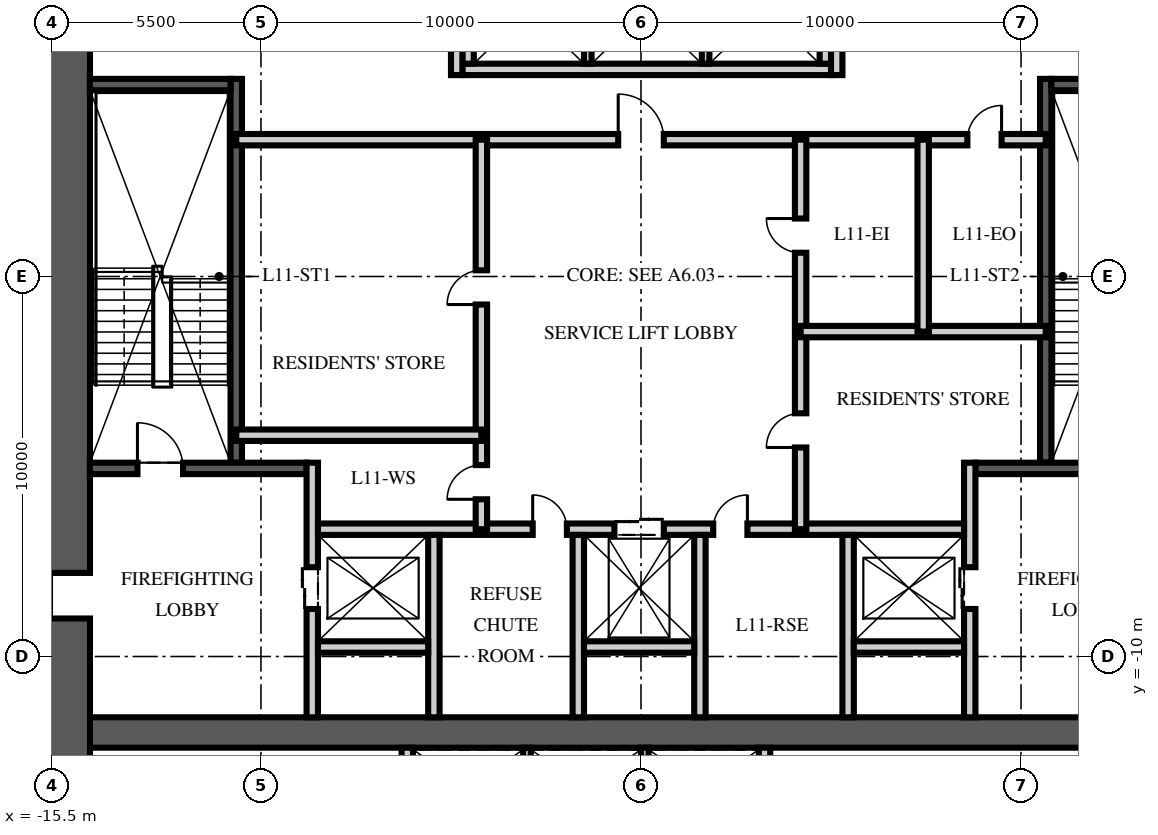
"""IFC4 building model, lengths in metres.
Left out: names, types, materials, properties, quantities, classifications, styles, units other than length and angle.
Written with IfcOpenShell. Run it as: python <this file> out.ifc"""

import sys

from ifc_helpers import new_model, si_unit, direction, frame, frame_2d, origin, place, context, subcontext, project, spatial, rectangle, extrude, element, fill, save


model = new_model("IFC4")
c1 = context("Model", 3, precision=1e-05, world=origin(), true_north=direction((0.0, 1.0)))
c2 = subcontext(c1, "Body", "Model", "MODEL_VIEW")
j1 = project(units=[si_unit("LENGTHUNIT", "METRE"), si_unit("PLANEANGLEUNIT", "RADIAN")], contexts=[c1])
p1 = place(None, origin())
s1 = spatial("IfcSite", under=j1, at=p1, CompositionType="ELEMENT")
p2 = place(p1, origin())
s2 = spatial("IfcBuilding", under=s1, at=p2, CompositionType="ELEMENT")
p3 = place(p2, frame((0.0, 0.0, 47.25)))
s3 = spatial("IfcBuildingStorey", under=s2, at=p3, CompositionType="ELEMENT", Elevation=47.25)
p4 = place(p3, frame((-15.5, -12.0, -0.25), z_axis=(0.0, 0.0, 1.0), x_axis=(1.0, 0.0, 0.0)))
e1 = element("IfcWall", 1, at=p4, inside=s3, PredefinedType="SHEAR", context=c2, shape_type="SweptSolid", body=[
    extrude(rectangle(XDim=31.0, YDim=0.8, at=frame_2d((15.5, 0.0))), origin(), (0.0, 0.0, 1.0), 3.75),
])
p5 = place(p3, frame((-15.5, -15.5, -0.25), z_axis=(0.0, 0.0, 1.0), x_axis=(0.0, 1.0, 0.0)))
e2 = element("IfcWall", 2, at=p5, inside=s3, PredefinedType="SHEAR", context=c2, shape_type="SweptSolid", body=[
    extrude(rectangle(XDim=31.0, YDim=2.0, at=frame_2d((15.5, 0.0))), origin(), (0.0, 0.0, 1.0), 3.75),
])
p6 = place(p5, frame((6.5, 0.0, 0.25)))
e3 = element("IfcOpeningElement", 3, at=p6, cuts=e2, PredefinedType="OPENING", context=c2, shape_type="SweptSolid", body=[
    extrude(rectangle(XDim=1.2, YDim=2.1, at=frame_2d((0.6, 1.05))), frame((0.0, 1.01, 0.0), z_axis=(0.0, -1.0, 0.0), x_axis=(1.0, 0.0, 0.0)), (0.0, 0.0, 1.0), 2.02),
])
p7 = place(p5, frame((23.0, 0.0, 0.25)))
e4 = element("IfcOpeningElement", 4, at=p7, cuts=e2, PredefinedType="OPENING", context=c2, shape_type="SweptSolid", body=[
    extrude(rectangle(XDim=1.8, YDim=2.1, at=frame_2d((0.9, 1.05))), frame((0.0, 1.01, 0.0), z_axis=(0.0, -1.0, 0.0), x_axis=(1.0, 0.0, 0.0)), (0.0, 0.0, 1.0), 2.02),
])
p8 = place(p3, frame((-10.65, -4.9, 0.0), z_axis=(0.0, 0.0, 1.0), x_axis=(0.0, 1.0, 0.0)))
e5 = element("IfcWall", 5, at=p8, inside=s3, PredefinedType="SOLIDWALL", context=c2, shape_type="SweptSolid", body=[
    extrude(rectangle(XDim=10.1, YDim=0.3, at=frame_2d((5.05, 0.0))), origin(), (0.0, 0.0, 1.0), 3.5),
])
p9 = place(p3, frame((-14.5, -5.05, 0.0), z_axis=(0.0, 0.0, 1.0), x_axis=(1.0, 0.0, 0.0)))
e6 = element("IfcWall", 6, at=p9, inside=s3, PredefinedType="SOLIDWALL", context=c2, shape_type="SweptSolid", body=[
    extrude(rectangle(XDim=5.7, YDim=0.3, at=frame_2d((2.85, 0.0))), origin(), (0.0, 0.0, 1.0), 3.5),
])
p10 = place(p9, frame((1.25, 0.0, 0.0)))
e7 = element("IfcOpeningElement", 7, at=p10, cuts=e6, PredefinedType="OPENING", context=c2, shape_type="SweptSolid", body=[
    extrude(rectangle(XDim=1.2, YDim=2.1, at=frame_2d((0.6, 1.05))), frame((0.0, 0.16, 0.0), z_axis=(0.0, -1.0, 0.0), x_axis=(1.0, 0.0, 0.0)), (0.0, 0.0, 1.0), 0.32),
])
p11 = place(p3, frame((-14.5, 5.05, 0.0), z_axis=(0.0, 0.0, 1.0), x_axis=(1.0, 0.0, 0.0)))
e8 = element("IfcWall", 8, at=p11, inside=s3, PredefinedType="SOLIDWALL", context=c2, shape_type="SweptSolid", body=[
    extrude(rectangle(XDim=3.7, YDim=0.3, at=frame_2d((1.85, 0.0))), origin(), (0.0, 0.0, 1.0), 3.5),
])
p12 = place(p3, frame((-8.65, -11.6, 0.0), z_axis=(0.0, 0.0, 1.0), x_axis=(0.0, 1.0, 0.0)))
e9 = element("IfcWall", 9, at=p12, inside=s3, PredefinedType="PARTITIONING", context=c2, shape_type="SweptSolid", body=[
    extrude(rectangle(XDim=6.7, YDim=0.3, at=frame_2d((3.35, 0.0))), origin(), (0.0, 0.0, 1.0), 3.5),
])
p13 = place(p12, frame((2.85, 0.0, 0.0)))
e10 = element("IfcOpeningElement", 10, at=p13, cuts=e9, PredefinedType="OPENING", context=c2, shape_type="SweptSolid", body=[
    extrude(rectangle(XDim=1.1, YDim=2.1, at=frame_2d((0.55, 1.05))), frame((0.0, 0.16, 0.0), z_axis=(0.0, -1.0, 0.0), x_axis=(1.0, 0.0, 0.0)), (0.0, 0.0, 1.0), 0.32),
])
p14 = place(p3, frame((10.65, -4.9, 0.0), z_axis=(0.0, 0.0, 1.0), x_axis=(0.0, 1.0, 0.0)))
e11 = element("IfcWall", 11, at=p14, inside=s3, PredefinedType="SOLIDWALL", context=c2, shape_type="SweptSolid", body=[
    extrude(rectangle(XDim=10.1, YDim=0.3, at=frame_2d((5.05, 0.0))), origin(), (0.0, 0.0, 1.0), 3.5),
])
p15 = place(p3, frame((14.5, -5.05, 0.0), z_axis=(0.0, 0.0, 1.0), x_axis=(-1.0, 0.0, 0.0)))
e12 = element("IfcWall", 12, at=p15, inside=s3, PredefinedType="SOLIDWALL", context=c2, shape_type="SweptSolid", body=[
    extrude(rectangle(XDim=5.7, YDim=0.3, at=frame_2d((2.85, 0.0))), origin(), (0.0, 0.0, 1.0), 3.5),
])
p16 = place(p15, frame((1.25, 0.0, 0.0)))
e13 = element("IfcOpeningElement", 13, at=p16, cuts=e12, PredefinedType="OPENING", context=c2, shape_type="SweptSolid", body=[
    extrude(rectangle(XDim=1.2, YDim=2.1, at=frame_2d((0.6, 1.05))), frame((0.0, 0.16, 0.0), z_axis=(0.0, -1.0, 0.0), x_axis=(1.0, 0.0, 0.0)), (0.0, 0.0, 1.0), 0.32),
])
p17 = place(p3, frame((14.5, 5.05, 0.0), z_axis=(0.0, 0.0, 1.0), x_axis=(-1.0, 0.0, 0.0)))
e14 = element("IfcWall", 14, at=p17, inside=s3, PredefinedType="SOLIDWALL", context=c2, shape_type="SweptSolid", body=[
    extrude(rectangle(XDim=3.7, YDim=0.3, at=frame_2d((1.85, 0.0))), origin(), (0.0, 0.0, 1.0), 3.5),
])
p18 = place(p3, frame((8.65, -11.6, 0.0), z_axis=(0.0, 0.0, 1.0), x_axis=(0.0, 1.0, 0.0)))
e15 = element("IfcWall", 15, at=p18, inside=s3, PredefinedType="PARTITIONING", context=c2, shape_type="SweptSolid", body=[
    extrude(rectangle(XDim=6.7, YDim=0.3, at=frame_2d((3.35, 0.0))), origin(), (0.0, 0.0, 1.0), 3.5),
])
p19 = place(p18, frame((2.85, 0.0, 0.0)))
e16 = element("IfcOpeningElement", 16, at=p19, cuts=e15, PredefinedType="OPENING", context=c2, shape_type="SweptSolid", body=[
    extrude(rectangle(XDim=1.1, YDim=2.1, at=frame_2d((0.55, 1.05))), frame((0.0, 0.16, 0.0), z_axis=(0.0, -1.0, 0.0), x_axis=(1.0, 0.0, 0.0)), (0.0, 0.0, 1.0), 0.32),
])
p20 = place(p3, frame((-8.5, -6.65, 0.0), z_axis=(0.0, 0.0, 1.0), x_axis=(1.0, 0.0, 0.0)))
e17 = element("IfcWall", 17, at=p20, inside=s3, PredefinedType="PARTITIONING", context=c2, shape_type="SweptSolid", body=[
    extrude(rectangle(XDim=17.0, YDim=0.3, at=frame_2d((8.5, 0.0))), origin(), (0.0, 0.0, 1.0), 3.5),
])
p21 = place(p20, frame((7.8, 0.0, 0.0)))
e18 = element("IfcOpeningElement", 18, at=p21, cuts=e17, PredefinedType="OPENING", context=c2, shape_type="SweptSolid", body=[
    extrude(rectangle(XDim=1.3, YDim=2.4, at=frame_2d((0.65, 1.2))), frame((0.0, 0.16, 0.0), z_axis=(0.0, -1.0, 0.0), x_axis=(1.0, 0.0, 0.0)), (0.0, 0.0, 1.0), 0.32),
])
p22 = place(p20, frame((5.65, 0.0, 0.0)))
e19 = element("IfcOpeningElement", 19, at=p22, cuts=e17, PredefinedType="OPENING", context=c2, shape_type="SweptSolid", body=[
    extrude(rectangle(XDim=0.9, YDim=2.1, at=frame_2d((0.45, 1.05))), frame((0.0, 0.16, 0.0), z_axis=(0.0, -1.0, 0.0), x_axis=(1.0, 0.0, 0.0)), (0.0, 0.0, 1.0), 0.32),
])
p23 = place(p20, frame((10.4, 0.0, 0.0)))
e20 = element("IfcOpeningElement", 20, at=p23, cuts=e17, PredefinedType="OPENING", context=c2, shape_type="SweptSolid", body=[
    extrude(rectangle(XDim=0.9, YDim=2.1, at=frame_2d((0.45, 1.05))), frame((0.0, 0.16, 0.0), z_axis=(0.0, -1.0, 0.0), x_axis=(1.0, 0.0, 0.0)), (0.0, 0.0, 1.0), 0.32),
])
for number, where, z_axis, x_axis in (
    (21, (-5.45, -11.6, 0.0), (0.0, 0.0, 1.0), (0.0, 1.0, 0.0)),
    (22, (-1.65, -11.6, 0.0), (0.0, 0.0, 1.0), (0.0, 1.0, 0.0)),
    (23, (1.55, -11.6, 0.0), (0.0, 0.0, 1.0), (0.0, 1.0, 0.0)),
    (24, (5.45, -11.6, 0.0), (0.0, 0.0, 1.0), (0.0, 1.0, 0.0)),
):
    element("IfcWall", number, at=place(p3, frame(where, z_axis=z_axis, x_axis=x_axis)), inside=s3, PredefinedType="PARTITIONING", context=c2, shape_type="SweptSolid", body=[
        extrude(rectangle(XDim=4.8, YDim=0.3, at=frame_2d((2.4, 0.0))), origin(), (0.0, 0.0, 1.0), 3.5),
    ])
for number, where, z_axis, x_axis in (
    (25, (-8.5, -9.75, 0.0), (0.0, 0.0, 1.0), (1.0, 0.0, 0.0)),
    (26, (-1.5, -9.75, 0.0), (0.0, 0.0, 1.0), (1.0, 0.0, 0.0)),
    (27, (5.6, -9.75, 0.0), (0.0, 0.0, 1.0), (1.0, 0.0, 0.0)),
):
    element("IfcWall", number, at=place(p3, frame(where, z_axis=z_axis, x_axis=x_axis)), inside=s3, PredefinedType="PARTITIONING", context=c2, shape_type="SweptSolid", body=[
        extrude(rectangle(XDim=2.9, YDim=0.3, at=frame_2d((1.45, 0.0))), origin(), (0.0, 0.0, 1.0), 3.5),
    ])
p24 = place(p3, frame((-4.7, 5.45, 0.0), z_axis=(0.0, 0.0, 1.0), x_axis=(1.0, 0.0, 0.0)))
e28 = element("IfcWall", 28, at=p24, inside=s3, PredefinedType="PARTITIONING", context=c2, shape_type="SweptSolid", body=[
    extrude(rectangle(XDim=9.7, YDim=0.3, at=frame_2d((4.85, 0.0))), origin(), (0.0, 0.0, 1.0), 3.5),
])
for number, where, z_axis, x_axis in (
    (29, (-4.55, 5.6, 0.0), (0.0, 0.0, 1.0), (0.0, 1.0, 0.0)),
    (30, (4.85, 5.6, 0.0), (0.0, 0.0, 1.0), (0.0, 1.0, 0.0)),
):
    element("IfcWall", number, at=place(p3, frame(where, z_axis=z_axis, x_axis=x_axis)), inside=s3, PredefinedType="PARTITIONING", context=c2, shape_type="SweptSolid", body=[
        extrude(rectangle(XDim=2.8, YDim=0.3, at=frame_2d((1.4, 0.0))), origin(), (0.0, 0.0, 1.0), 3.5),
    ])
for number, where, z_axis, x_axis in (
    (31, (-1.4, 5.6, 0.0), (0.0, 0.0, 1.0), (0.0, 1.0, 0.0)),
    (32, (1.7, 5.6, 0.0), (0.0, 0.0, 1.0), (0.0, 1.0, 0.0)),
):
    element("IfcWall", number, at=place(p3, frame(where, z_axis=z_axis, x_axis=x_axis)), inside=s3, PredefinedType="PARTITIONING", context=c2, shape_type="SweptSolid", body=[
        extrude(rectangle(XDim=2.8, YDim=0.2, at=frame_2d((1.4, 0.0))), origin(), (0.0, 0.0, 1.0), 3.5),
    ])
for number, where, z_axis, x_axis in (
    (33, (-6.15, -14.5, 0.0), (0.0, 0.0, 1.0), (0.0, 1.0, 0.0)),
    (34, (3.25, -14.5, 0.0), (0.0, 0.0, 1.0), (0.0, 1.0, 0.0)),
):
    element("IfcWall", number, at=place(p3, frame(where, z_axis=z_axis, x_axis=x_axis)), inside=s3, PredefinedType="PARTITIONING", context=c2, shape_type="SweptSolid", body=[
        extrude(rectangle(XDim=2.1, YDim=0.3, at=frame_2d((1.05, 0.0))), origin(), (0.0, 0.0, 1.0), 3.5),
    ])
for number, where, z_axis, x_axis in (
    (35, (-3.0, -14.5, 0.0), (0.0, 0.0, 1.0), (0.0, 1.0, 0.0)),
    (36, (0.1, -14.5, 0.0), (0.0, 0.0, 1.0), (0.0, 1.0, 0.0)),
):
    element("IfcWall", number, at=place(p3, frame(where, z_axis=z_axis, x_axis=x_axis)), inside=s3, PredefinedType="PARTITIONING", context=c2, shape_type="SweptSolid", body=[
        extrude(rectangle(XDim=2.1, YDim=0.2, at=frame_2d((1.05, 0.0))), origin(), (0.0, 0.0, 1.0), 3.5),
    ])
p25 = place(p3, frame((-10.65, 3.6, 0.0), z_axis=(0.0, 0.0, 1.0), x_axis=(1.0, 0.0, 0.0)))
e37 = element("IfcWall", 37, at=p25, inside=s3, PredefinedType="PARTITIONING", context=c2, shape_type="SweptSolid", body=[
    extrude(rectangle(XDim=21.3, YDim=0.3, at=frame_2d((10.65, 0.0))), origin(), (0.0, 0.0, 1.0), 3.5),
])
p26 = place(p25, frame((10.05, 0.0, 0.0)))
e38 = element("IfcOpeningElement", 38, at=p26, cuts=e37, PredefinedType="OPENING", context=c2, shape_type="SweptSolid", body=[
    extrude(rectangle(XDim=1.2, YDim=2.1, at=frame_2d((0.6, 1.05))), frame((0.0, 0.16, 0.0), z_axis=(0.0, -1.0, 0.0), x_axis=(1.0, 0.0, 0.0)), (0.0, 0.0, 1.0), 0.32),
])
p27 = place(p25, frame((19.238, 0.0, 0.0)))
e39 = element("IfcOpeningElement", 39, at=p27, cuts=e37, PredefinedType="OPENING", context=c2, shape_type="SweptSolid", body=[
    extrude(rectangle(XDim=0.9, YDim=2.1, at=frame_2d((0.45, 1.05))), frame((0.0, 0.16, 0.0), z_axis=(0.0, -1.0, 0.0), x_axis=(1.0, 0.0, 0.0)), (0.0, 0.0, 1.0), 0.32),
])
p28 = place(p3, frame((-4.2, -6.65, 0.0), z_axis=(0.0, 0.0, 1.0), x_axis=(0.0, 1.0, 0.0)))
e40 = element("IfcWall", 40, at=p28, inside=s3, PredefinedType="PARTITIONING", context=c2, shape_type="SweptSolid", body=[
    extrude(rectangle(XDim=10.25, YDim=0.3, at=frame_2d((5.125, 0.0))), origin(), (0.0, 0.0, 1.0), 3.5),
])
p29 = place(p28, frame((0.787, 0.0, 0.0)))
e41 = element("IfcOpeningElement", 41, at=p29, cuts=e40, PredefinedType="OPENING", context=c2, shape_type="SweptSolid", body=[
    extrude(rectangle(XDim=0.9, YDim=2.1, at=frame_2d((0.45, 1.05))), frame((0.0, 0.16, 0.0), z_axis=(0.0, -1.0, 0.0), x_axis=(1.0, 0.0, 0.0)), (0.0, 0.0, 1.0), 0.32),
])
p30 = place(p28, frame((5.912, 0.0, 0.0)))
e42 = element("IfcOpeningElement", 42, at=p30, cuts=e40, PredefinedType="OPENING", context=c2, shape_type="SweptSolid", body=[
    extrude(rectangle(XDim=0.9, YDim=2.1, at=frame_2d((0.45, 1.05))), frame((0.0, 0.16, 0.0), z_axis=(0.0, -1.0, 0.0), x_axis=(1.0, 0.0, 0.0)), (0.0, 0.0, 1.0), 0.32),
])
p31 = place(p3, frame((4.2, -6.65, 0.0), z_axis=(0.0, 0.0, 1.0), x_axis=(0.0, 1.0, 0.0)))
e43 = element("IfcWall", 43, at=p31, inside=s3, PredefinedType="PARTITIONING", context=c2, shape_type="SweptSolid", body=[
    extrude(rectangle(XDim=10.25, YDim=0.3, at=frame_2d((5.125, 0.0))), origin(), (0.0, 0.0, 1.0), 3.5),
])
p32 = place(p31, frame((2.15, 0.0, 0.0)))
e44 = element("IfcOpeningElement", 44, at=p32, cuts=e43, PredefinedType="OPENING", context=c2, shape_type="SweptSolid", body=[
    extrude(rectangle(XDim=0.9, YDim=2.1, at=frame_2d((0.45, 1.05))), frame((0.0, 0.16, 0.0), z_axis=(0.0, -1.0, 0.0), x_axis=(1.0, 0.0, 0.0)), (0.0, 0.0, 1.0), 0.32),
])
p33 = place(p31, frame((7.275, 0.0, 0.0)))
e45 = element("IfcOpeningElement", 45, at=p33, cuts=e43, PredefinedType="OPENING", context=c2, shape_type="SweptSolid", body=[
    extrude(rectangle(XDim=0.9, YDim=2.1, at=frame_2d((0.45, 1.05))), frame((0.0, 0.16, 0.0), z_axis=(0.0, -1.0, 0.0), x_axis=(1.0, 0.0, 0.0)), (0.0, 0.0, 1.0), 0.32),
])
for number, where, z_axis, x_axis in (
    (46, (-10.65, -4.177, 0.0), (0.0, 0.0, 1.0), (1.0, 0.0, 0.0)),
    (47, (10.65, -1.45, 0.0), (0.0, 0.0, 1.0), (-1.0, 0.0, 0.0)),
):
    element("IfcWall", number, at=place(p3, frame(where, z_axis=z_axis, x_axis=x_axis)), inside=s3, PredefinedType="PARTITIONING", context=c2, shape_type="SweptSolid", body=[
        extrude(rectangle(XDim=6.45, YDim=0.3, at=frame_2d((3.225, 0.0))), origin(), (0.0, 0.0, 1.0), 3.5),
    ])
p34 = place(p3, frame((7.425, -1.45, 0.0), z_axis=(0.0, 0.0, 1.0), x_axis=(0.0, 1.0, 0.0)))
e48 = element("IfcWall", 48, at=p34, inside=s3, PredefinedType="PARTITIONING", context=c2, shape_type="SweptSolid", body=[
    extrude(rectangle(XDim=5.05, YDim=0.3, at=frame_2d((2.525, 0.0))), origin(), (0.0, 0.0, 1.0), 3.5),
])
p35 = place(p3, frame((-4.85, 5.3, 0.0), z_axis=(0.0, 0.0, 1.0), x_axis=(0.0, 1.0, 0.0)))
e49 = element("IfcWall", 49, at=p35, inside=s3, PredefinedType="PARTITIONING", context=c2, shape_type="SweptSolid", body=[
    extrude(rectangle(XDim=6.3, YDim=0.3, at=frame_2d((3.15, 0.0))), origin(), (0.0, 0.0, 1.0), 3.5),
])
p36 = place(p35, frame((4.35, 0.0, 0.0)))
e50 = element("IfcOpeningElement", 50, at=p36, cuts=e49, PredefinedType="OPENING", context=c2, shape_type="SweptSolid", body=[
    extrude(rectangle(XDim=0.9, YDim=2.1, at=frame_2d((0.45, 1.05))), frame((0.0, 0.16, 0.0), z_axis=(0.0, -1.0, 0.0), x_axis=(1.0, 0.0, 0.0)), (0.0, 0.0, 1.0), 0.32),
])
p37 = place(p3, frame((5.15, 5.3, 0.0), z_axis=(0.0, 0.0, 1.0), x_axis=(0.0, 1.0, 0.0)))
e51 = element("IfcWall", 51, at=p37, inside=s3, PredefinedType="PARTITIONING", context=c2, shape_type="SweptSolid", body=[
    extrude(rectangle(XDim=6.3, YDim=0.3, at=frame_2d((3.15, 0.0))), origin(), (0.0, 0.0, 1.0), 3.5),
])
p38 = place(p37, frame((4.35, 0.0, 0.0)))
e52 = element("IfcOpeningElement", 52, at=p38, cuts=e51, PredefinedType="OPENING", context=c2, shape_type="SweptSolid", body=[
    extrude(rectangle(XDim=0.9, YDim=2.1, at=frame_2d((0.45, 1.05))), frame((0.0, 0.16, 0.0), z_axis=(0.0, -1.0, 0.0), x_axis=(1.0, 0.0, 0.0)), (0.0, 0.0, 1.0), 0.32),
])
p39 = place(p10, origin())
e53 = element("IfcDoor", 53, at=p39, inside=s3, OperationType="SINGLE_SWING_LEFT", PredefinedType="DOOR", context=c2, shape_type="SweptSolid", body=[
    extrude(rectangle(XDim=1.2, YDim=2.1, at=frame_2d((0.6, 1.05))), frame((0.0, 0.025, 0.0), z_axis=(0.0, -1.0, 0.0), x_axis=(1.0, 0.0, 0.0)), (0.0, 0.0, 1.0), 0.05),
])
fill(e7, e53)
p40 = place(p6, origin())
e54 = element("IfcDoor", 54, at=p40, inside=s3, OperationType="SINGLE_SWING_LEFT", PredefinedType="DOOR", context=c2, shape_type="SweptSolid", body=[
    extrude(rectangle(XDim=1.2, YDim=2.1, at=frame_2d((0.6, 1.05))), frame((0.0, 0.025, 0.0), z_axis=(0.0, -1.0, 0.0), x_axis=(1.0, 0.0, 0.0)), (0.0, 0.0, 1.0), 0.05),
])
fill(e3, e54)
p41 = place(p13, origin())
e55 = element("IfcDoor", 55, at=p41, inside=s3, OperationType="DOUBLE_DOOR_SLIDING", PredefinedType="DOOR", context=c2, shape_type="SweptSolid", body=[
    extrude(rectangle(XDim=1.1, YDim=2.1, at=frame_2d((0.55, 1.05))), frame((0.0, 0.025, 0.0), z_axis=(0.0, -1.0, 0.0), x_axis=(1.0, 0.0, 0.0)), (0.0, 0.0, 1.0), 0.05),
])
fill(e10, e55)
p42 = place(p19, origin())
e56 = element("IfcDoor", 56, at=p42, inside=s3, OperationType="DOUBLE_DOOR_SLIDING", PredefinedType="DOOR", context=c2, shape_type="SweptSolid", body=[
    extrude(rectangle(XDim=1.1, YDim=2.1, at=frame_2d((0.55, 1.05))), frame((0.0, 0.025, 0.0), z_axis=(0.0, -1.0, 0.0), x_axis=(1.0, 0.0, 0.0)), (0.0, 0.0, 1.0), 0.05),
])
fill(e16, e56)
p43 = place(p21, origin())
e57 = element("IfcDoor", 57, at=p43, inside=s3, OperationType="DOUBLE_DOOR_SLIDING", PredefinedType="DOOR", context=c2, shape_type="SweptSolid", body=[
    extrude(rectangle(XDim=1.3, YDim=2.4, at=frame_2d((0.65, 1.2))), frame((0.0, 0.025, 0.0), z_axis=(0.0, -1.0, 0.0), x_axis=(1.0, 0.0, 0.0)), (0.0, 0.0, 1.0), 0.05),
])
fill(e18, e57)
p44 = place(p26, origin())
e58 = element("IfcDoor", 58, at=p44, inside=s3, OperationType="SINGLE_SWING_LEFT", PredefinedType="DOOR", context=c2, shape_type="SweptSolid", body=[
    extrude(rectangle(XDim=1.2, YDim=2.1, at=frame_2d((0.6, 1.05))), frame((0.0, 0.025, 0.0), z_axis=(0.0, -1.0, 0.0), x_axis=(1.0, 0.0, 0.0)), (0.0, 0.0, 1.0), 0.05),
])
fill(e38, e58)
p45 = place(p22, origin())
e59 = element("IfcDoor", 59, at=p45, inside=s3, OperationType="SINGLE_SWING_LEFT", PredefinedType="DOOR", context=c2, shape_type="SweptSolid", body=[
    extrude(rectangle(XDim=0.9, YDim=2.1, at=frame_2d((0.45, 1.05))), frame((0.0, 0.025, 0.0), z_axis=(0.0, -1.0, 0.0), x_axis=(1.0, 0.0, 0.0)), (0.0, 0.0, 1.0), 0.05),
])
fill(e19, e59)
p46 = place(p23, origin())
e60 = element("IfcDoor", 60, at=p46, inside=s3, OperationType="SINGLE_SWING_RIGHT", PredefinedType="DOOR", context=c2, shape_type="SweptSolid", body=[
    extrude(rectangle(XDim=0.9, YDim=2.1, at=frame_2d((0.45, 1.05))), frame((0.0, 0.025, 0.0), z_axis=(0.0, -1.0, 0.0), x_axis=(1.0, 0.0, 0.0)), (0.0, 0.0, 1.0), 0.05),
])
fill(e20, e60)
p47 = place(p29, origin())
e61 = element("IfcDoor", 61, at=p47, inside=s3, OperationType="SINGLE_SWING_LEFT", PredefinedType="DOOR", context=c2, shape_type="SweptSolid", body=[
    extrude(rectangle(XDim=0.9, YDim=2.1, at=frame_2d((0.45, 1.05))), frame((0.0, 0.025, 0.0), z_axis=(0.0, -1.0, 0.0), x_axis=(1.0, 0.0, 0.0)), (0.0, 0.0, 1.0), 0.05),
])
fill(e41, e61)
p48 = place(p30, origin())
e62 = element("IfcDoor", 62, at=p48, inside=s3, OperationType="SINGLE_SWING_LEFT", PredefinedType="DOOR", context=c2, shape_type="SweptSolid", body=[
    extrude(rectangle(XDim=0.9, YDim=2.1, at=frame_2d((0.45, 1.05))), frame((0.0, 0.025, 0.0), z_axis=(0.0, -1.0, 0.0), x_axis=(1.0, 0.0, 0.0)), (0.0, 0.0, 1.0), 0.05),
])
fill(e42, e62)
p49 = place(p32, origin())
e63 = element("IfcDoor", 63, at=p49, inside=s3, OperationType="SINGLE_SWING_LEFT", PredefinedType="DOOR", context=c2, shape_type="SweptSolid", body=[
    extrude(rectangle(XDim=0.9, YDim=2.1, at=frame_2d((0.45, 1.05))), frame((0.0, 0.025, 0.0), z_axis=(0.0, -1.0, 0.0), x_axis=(1.0, 0.0, 0.0)), (0.0, 0.0, 1.0), 0.05),
])
fill(e44, e63)
p50 = place(p33, origin())
e64 = element("IfcDoor", 64, at=p50, inside=s3, OperationType="SINGLE_SWING_RIGHT", PredefinedType="DOOR", context=c2, shape_type="SweptSolid", body=[
    extrude(rectangle(XDim=0.9, YDim=2.1, at=frame_2d((0.45, 1.05))), frame((0.0, 0.025, 0.0), z_axis=(0.0, -1.0, 0.0), x_axis=(1.0, 0.0, 0.0)), (0.0, 0.0, 1.0), 0.05),
])
fill(e45, e64)
p51 = place(p27, origin())
e65 = element("IfcDoor", 65, at=p51, inside=s3, OperationType="SINGLE_SWING_RIGHT", PredefinedType="DOOR", context=c2, shape_type="SweptSolid", body=[
    extrude(rectangle(XDim=0.9, YDim=2.1, at=frame_2d((0.45, 1.05))), frame((0.0, 0.025, 0.0), z_axis=(0.0, -1.0, 0.0), x_axis=(1.0, 0.0, 0.0)), (0.0, 0.0, 1.0), 0.05),
])
fill(e39, e65)
save(model, sys.argv[1])
